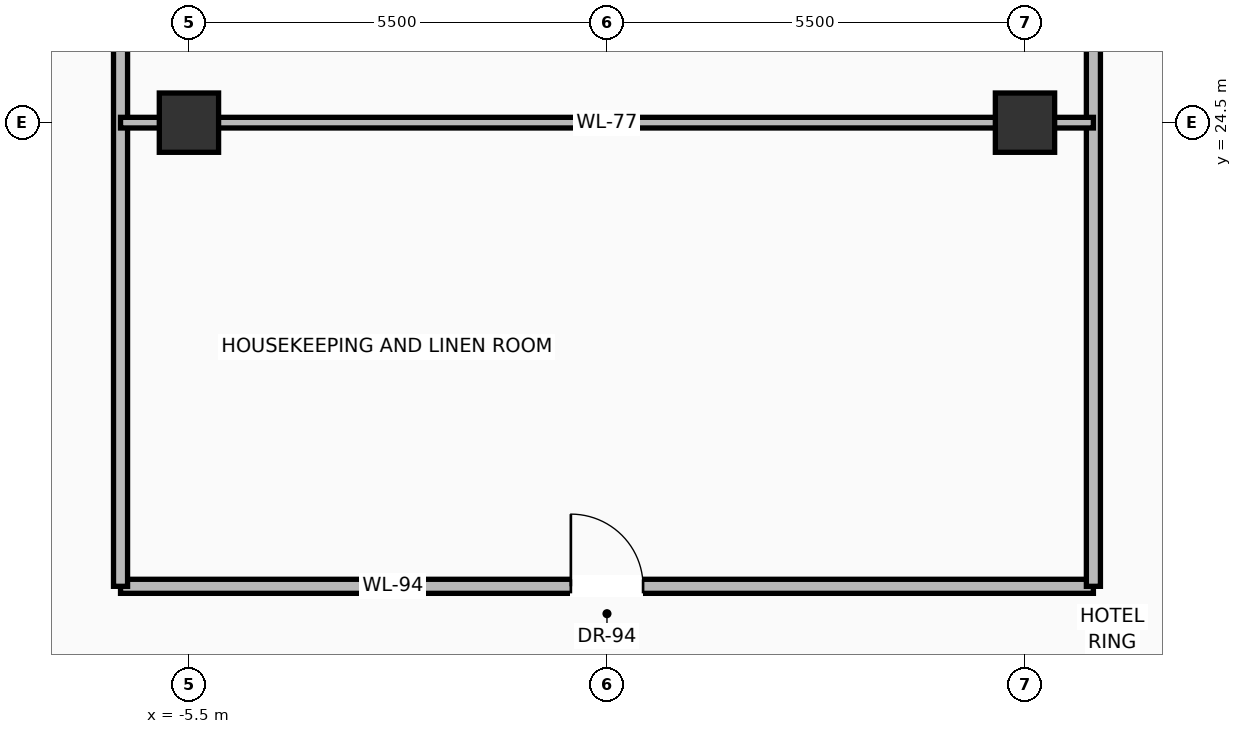
"""IFC4 building model, lengths in metres.
Left out: names, types, materials, properties, quantities, classifications, styles, units other than length and angle.
Written with IfcOpenShell. Run it as: python <this file> out.ifc"""

import sys

from ifc_helpers import new_model, si_unit, direction, frame, frame_2d, origin, origin_2d, place, context, subcontext, project, spatial, rectangle, extrude, source, transform, mapped, element, fill, save


model = new_model("IFC4")
c1 = context("Model", 3, precision=1e-05, world=origin(), true_north=direction((0.0, 1.0)))
c2 = subcontext(c1, "Body", "Model", "MODEL_VIEW")
j1 = project(units=[si_unit("LENGTHUNIT", "METRE"), si_unit("PLANEANGLEUNIT", "RADIAN")], contexts=[c1])
p1 = place(None, origin())
s1 = spatial("IfcSite", under=j1, at=p1, CompositionType="ELEMENT")
p2 = place(p1, origin())
s2 = spatial("IfcBuilding", under=s1, at=p2, CompositionType="ELEMENT")
p3 = place(p2, frame((0.0, 0.0, 226.9)))
s3 = spatial("IfcBuildingStorey", under=s2, at=p3, CompositionType="ELEMENT", Elevation=226.9)
m1 = source(origin(), c2, "Body", "SweptSolid", [
    extrude(rectangle(XDim=0.78, YDim=0.78, at=origin_2d()), origin(), (0.0, 0.0, 1.0), 3.45),
])
for number, where, z_axis, x_axis in (
    (1, (-5.5, 24.5, 0.0), (0.0, 0.0, 1.0), (1.0, 0.0, 0.0)),
    (2, (5.5, 24.5, 0.0), (0.0, 0.0, 1.0), (1.0, 0.0, 0.0)),
):
    element("IfcColumn", number, at=place(p3, frame(where, z_axis=z_axis, x_axis=x_axis)), inside=s3, PredefinedType="COLUMN", context=c2, shape_type="MappedRepresentation", body=[
        mapped(m1, transform((0.0, 0.0, 0.0), scale=1.0)),
    ])
p4 = place(p3, frame((-6.4, 18.4, 0.0), z_axis=(0.0, 0.0, 1.0), x_axis=(1.0, 0.0, 0.0)))
e3 = element("IfcWall", 3, at=p4, inside=s3, PredefinedType="PARTITIONING", context=c2, shape_type="SweptSolid", body=[
    extrude(rectangle(XDim=12.8, YDim=0.185, at=frame_2d((6.4, 0.0))), origin(), (0.0, 0.0, 1.0), 3.232),
])
p5 = place(p4, frame((5.925, 0.0, 0.0)))
e4 = element("IfcOpeningElement", 4, at=p5, cuts=e3, PredefinedType="OPENING", context=c2, shape_type="SweptSolid", body=[
    extrude(rectangle(XDim=0.95, YDim=2.2, at=frame_2d((0.475, 1.1))), frame((0.0, 0.103, 0.0), z_axis=(0.0, -1.0, 0.0), x_axis=(1.0, 0.0, 0.0)), (0.0, 0.0, 1.0), 0.205),
])
for number, where, z_axis, x_axis in (
    (5, (-6.4, 18.4, 0.0), (0.0, 0.0, 1.0), (0.0, 1.0, 0.0)),
    (6, (6.4, 18.4, 0.0), (0.0, 0.0, 1.0), (0.0, 1.0, 0.0)),
):
    element("IfcWall", number, at=place(p3, frame(where, z_axis=z_axis, x_axis=x_axis)), inside=s3, PredefinedType="PARTITIONING", context=c2, shape_type="SweptSolid", body=[
        extrude(rectangle(XDim=9.1, YDim=0.185, at=frame_2d((4.55, 0.0))), origin(), (0.0, 0.0, 1.0), 3.232),
    ])
p6 = place(p3, frame((-6.4, 24.5, 0.0), z_axis=(0.0, 0.0, 1.0), x_axis=(1.0, 0.0, 0.0)))
e7 = element("IfcWall", 7, at=p6, inside=s3, PredefinedType="PARTITIONING", context=c2, shape_type="SweptSolid", body=[
    extrude(rectangle(XDim=12.8, YDim=0.14, at=frame_2d((6.4, 0.0))), origin(), (0.0, 0.0, 1.0), 2.683),
])
m2 = source(origin(), c2, "Body", "SweptSolid", [
    extrude(rectangle(XDim=0.95, YDim=2.2, at=frame_2d((0.475, 1.1))), frame((0.0, 0.025, 0.0), z_axis=(0.0, -1.0, 0.0), x_axis=(1.0, 0.0, 0.0)), (0.0, 0.0, 1.0), 0.05),
])
p7 = place(p5, origin())
e8 = element("IfcDoor", 8, at=p7, inside=s3, OperationType="SINGLE_SWING_LEFT", PredefinedType="DOOR", context=c2, shape_type="MappedRepresentation", body=[
    mapped(m2, transform((0.0, 0.0, 0.0), scale=1.0)),
])
fill(e4, e8)
save(model, sys.argv[1])
